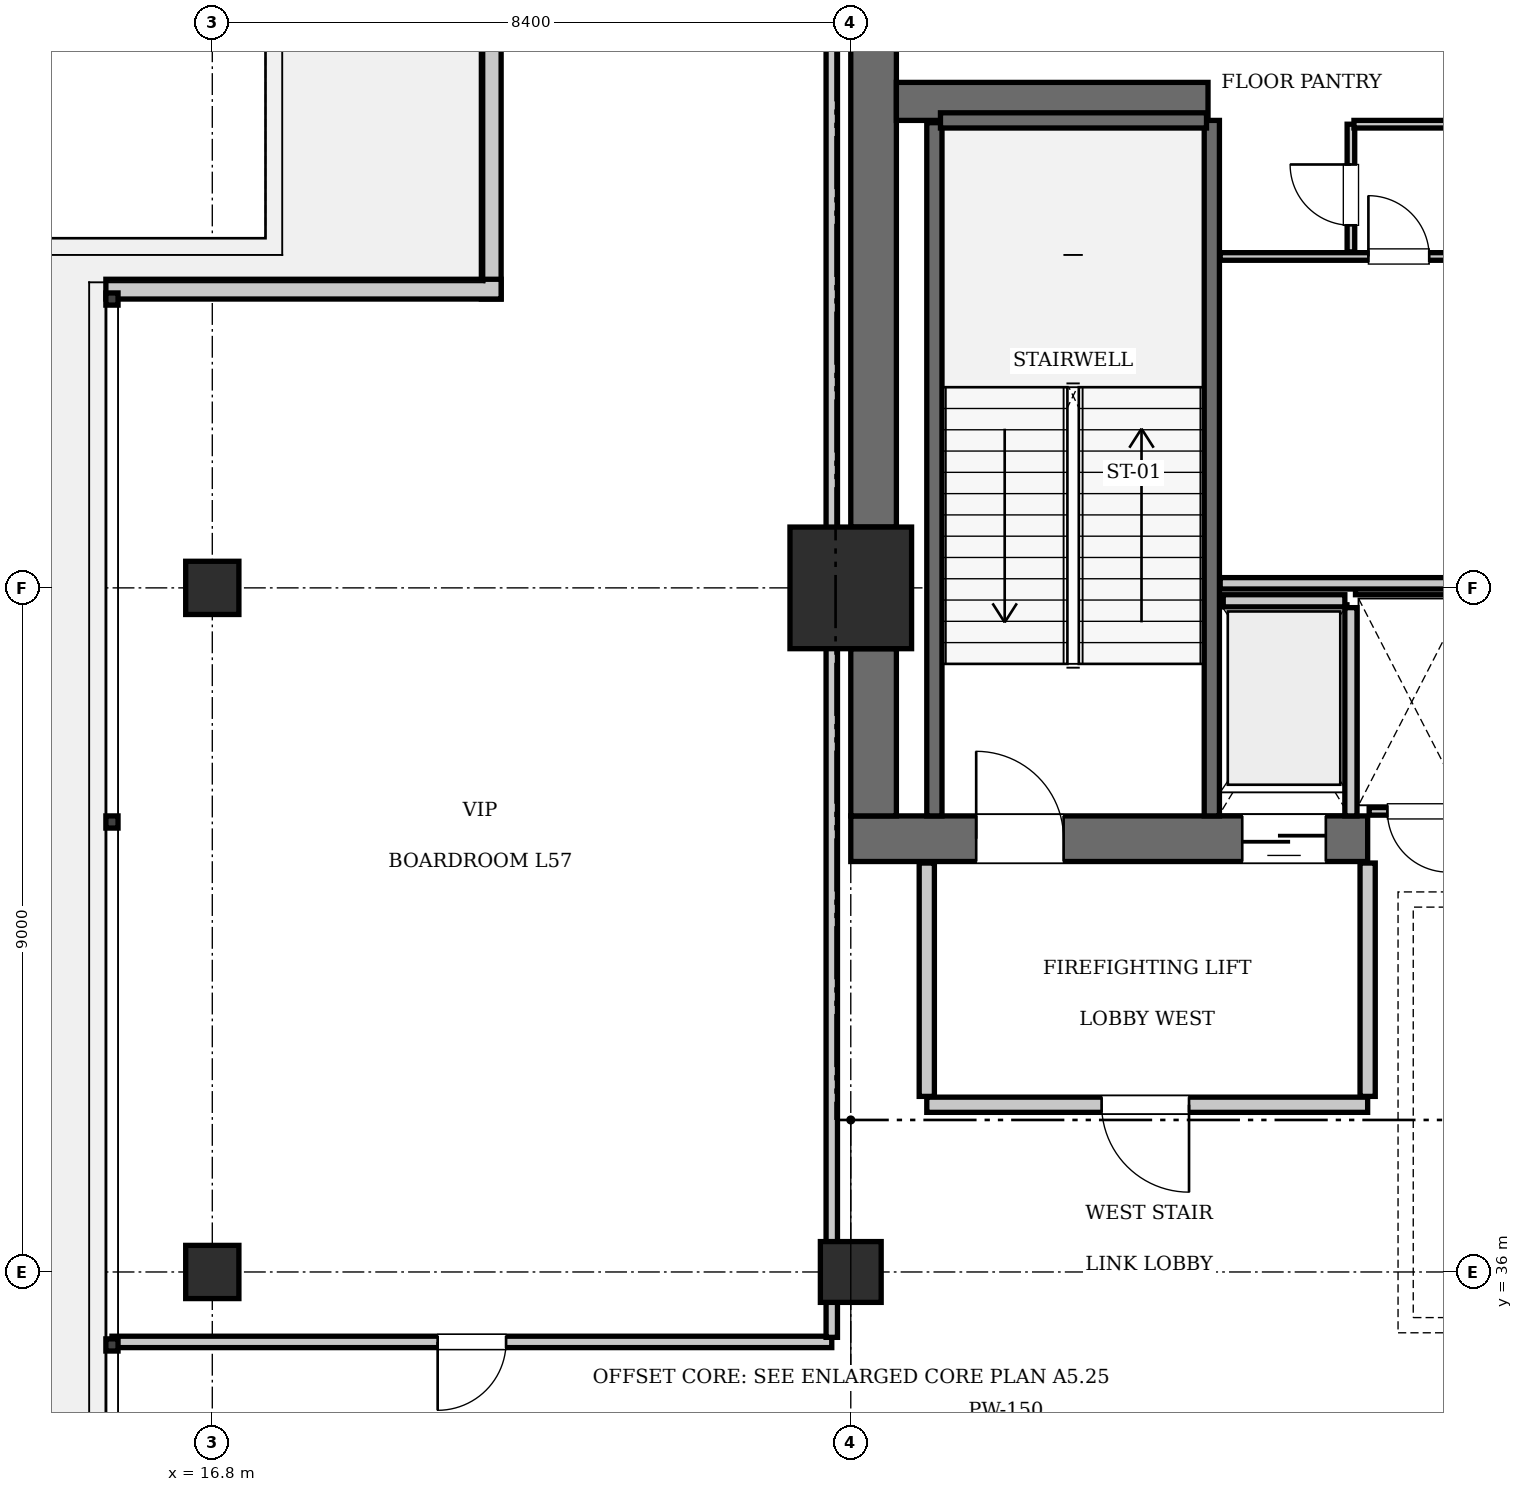
"""IFC4 building model, lengths in metres.
Left out: names, types, materials, properties, quantities, classifications, styles, units other than length and angle.
Written with IfcOpenShell. Run it as: python <this file> out.ifc"""

import sys

from ifc_helpers import new_model, si_unit, direction, frame, frame_2d, origin, origin_2d, place, context, subcontext, project, spatial, rectangle, extrude, element, fill, save


model = new_model("IFC4")
c1 = context("Model", 3, precision=1e-05, world=origin(), true_north=direction((0.0, 1.0)))
c2 = subcontext(c1, "Body", "Model", "MODEL_VIEW")
j1 = project(units=[si_unit("LENGTHUNIT", "METRE"), si_unit("PLANEANGLEUNIT", "RADIAN")], contexts=[c1])
p1 = place(None, origin())
s1 = spatial("IfcSite", under=j1, at=p1, CompositionType="ELEMENT")
p2 = place(p1, origin())
s2 = spatial("IfcBuilding", under=s1, at=p2, CompositionType="ELEMENT")
p3 = place(p2, frame((0.0, 0.0, 234.5)))
s3 = spatial("IfcBuildingStorey", under=s2, at=p3, CompositionType="ELEMENT", Elevation=234.5)
p4 = place(p3, frame((25.2, 45.0, 0.0), z_axis=(0.0, 0.0, 1.0), x_axis=(1.0, 0.0, 0.0)))
e1 = element("IfcColumn", 1, at=p4, inside=s3, PredefinedType="COLUMN", context=c2, shape_type="SweptSolid", body=[
    extrude(rectangle(XDim=1.6, YDim=1.6, at=origin_2d()), origin(), (0.0, 0.0, 1.0), 4.9),
])
p5 = place(p3, frame((25.2, 41.7, 0.0), z_axis=(0.0, 0.0, 1.0), x_axis=(1.0, 0.0, 0.0)))
e2 = element("IfcWall", 2, at=p5, inside=s3, PredefinedType="SHEAR", context=c2, shape_type="SweptSolid", body=[
    extrude(rectangle(XDim=6.8, YDim=0.6, at=frame_2d((3.4, 0.0))), origin(), (0.0, 0.0, 1.0), 4.9),
])
p6 = place(p5, frame((1.65, 0.0, 0.0)))
e3 = element("IfcOpeningElement", 3, at=p6, cuts=e2, PredefinedType="OPENING", context=c2, shape_type="SweptSolid", body=[
    extrude(rectangle(XDim=1.15, YDim=2.15, at=frame_2d((0.575, 1.075))), frame((0.0, 0.31, 0.0), z_axis=(0.0, -1.0, 0.0), x_axis=(1.0, 0.0, 0.0)), (0.0, 0.0, 1.0), 0.62),
])
p7 = place(p5, frame((5.15, 0.0, 0.0)))
e4 = element("IfcOpeningElement", 4, at=p7, cuts=e2, PredefinedType="OPENING", context=c2, shape_type="SweptSolid", body=[
    extrude(rectangle(XDim=1.1, YDim=2.2, at=frame_2d((0.55, 1.1))), frame((0.0, 0.31, 0.0), z_axis=(0.0, -1.0, 0.0), x_axis=(1.0, 0.0, 0.0)), (0.0, 0.0, 1.0), 0.62),
])
p8 = place(p3, frame((25.5, 42.0, 0.0), z_axis=(0.0, 0.0, 1.0), x_axis=(0.0, 1.0, 0.0)))
e5 = element("IfcWall", 5, at=p8, inside=s3, PredefinedType="SHEAR", context=c2, shape_type="SweptSolid", body=[
    extrude(rectangle(XDim=2.2, YDim=0.6, at=frame_2d((1.1, 0.0))), origin(), (0.0, 0.0, 1.0), 4.9),
])
p9 = place(p3, frame((25.5, 45.8, 0.0), z_axis=(0.0, 0.0, 1.0), x_axis=(0.0, 1.0, 0.0)))
e6 = element("IfcWall", 6, at=p9, inside=s3, PredefinedType="SHEAR", context=c2, shape_type="SweptSolid", body=[
    extrude(rectangle(XDim=7.6, YDim=0.6, at=frame_2d((3.8, 0.0))), origin(), (0.0, 0.0, 1.0), 4.9),
])
p10 = place(p3, frame((25.8, 51.4, 0.0), z_axis=(0.0, 0.0, 1.0), x_axis=(1.0, 0.0, 0.0)))
e7 = element("IfcWall", 7, at=p10, inside=s3, PredefinedType="SHEAR", context=c2, shape_type="SweptSolid", body=[
    extrude(rectangle(XDim=4.1, YDim=0.5, at=frame_2d((2.05, 0.0))), origin(), (0.0, 0.0, 1.0), 4.9),
])
p11 = place(p3, frame((25.2, 36.0, 0.0), z_axis=(0.0, 0.0, 1.0), x_axis=(1.0, 0.0, 0.0)))
e8 = element("IfcColumn", 8, at=p11, inside=s3, PredefinedType="COLUMN", context=c2, shape_type="SweptSolid", body=[
    extrude(rectangle(XDim=0.8, YDim=0.8, at=origin_2d()), origin(), (0.0, 0.0, 1.0), 4.9),
])
for number, where, z_axis, x_axis in (
    (9, (16.8, 36.0, 0.0), (0.0, 0.0, 1.0), (1.0, 0.0, 0.0)),
    (10, (16.8, 45.0, 0.0), (0.0, 0.0, 1.0), (1.0, 0.0, 0.0)),
):
    element("IfcColumn", number, at=place(p3, frame(where, z_axis=z_axis, x_axis=x_axis)), inside=s3, PredefinedType="COLUMN", context=c2, shape_type="SweptSolid", body=[
        extrude(rectangle(XDim=0.7, YDim=0.7, at=origin_2d()), origin(), (0.0, 0.0, 1.0), 4.9),
    ])
p12 = place(p3, frame((29.95, 42.0, 0.0), z_axis=(0.0, 0.0, 1.0), x_axis=(0.0, 1.0, 0.0)))
e11 = element("IfcWall", 11, at=p12, inside=s3, PredefinedType="SOLIDWALL", context=c2, shape_type="SweptSolid", body=[
    extrude(rectangle(XDim=9.15, YDim=0.2, at=frame_2d((4.575, 0.0))), origin(), (0.0, 0.0, 1.0), 4.66),
])
p13 = place(p3, frame((26.3, 42.0, 0.0), z_axis=(0.0, 0.0, 1.0), x_axis=(0.0, 1.0, 0.0)))
e12 = element("IfcWall", 12, at=p13, inside=s3, PredefinedType="SOLIDWALL", context=c2, shape_type="SweptSolid", body=[
    extrude(rectangle(XDim=9.12, YDim=0.2, at=frame_2d((4.56, 0.0))), origin(), (0.0, 0.0, 1.0), 4.66),
])
p14 = place(p3, frame((26.38, 51.15, 0.0), z_axis=(0.0, 0.0, 1.0), x_axis=(1.0, 0.0, 0.0)))
e13 = element("IfcWall", 13, at=p14, inside=s3, PredefinedType="SOLIDWALL", context=c2, shape_type="SweptSolid", body=[
    extrude(rectangle(XDim=3.5, YDim=0.2, at=frame_2d((1.75, 0.0))), origin(), (0.0, 0.0, 1.0), 4.66),
])
p15 = place(p3, frame((30.1, 44.83, 0.0), z_axis=(0.0, 0.0, 1.0), x_axis=(1.0, 0.0, 0.0)))
e14 = element("IfcWall", 14, at=p15, inside=s3, PredefinedType="SOLIDWALL", context=c2, shape_type="SweptSolid", body=[
    extrude(rectangle(XDim=1.6, YDim=0.16, at=frame_2d((0.8, 0.0))), origin(), (0.0, 0.0, 1.0), 4.66),
])
p16 = place(p3, frame((31.78, 42.0, 0.0), z_axis=(0.0, 0.0, 1.0), x_axis=(0.0, 1.0, 0.0)))
e15 = element("IfcWall", 15, at=p16, inside=s3, PredefinedType="SOLIDWALL", context=c2, shape_type="SweptSolid", body=[
    extrude(rectangle(XDim=2.74, YDim=0.16, at=frame_2d((1.37, 0.0))), origin(), (0.0, 0.0, 1.0), 4.66),
])
p17 = place(p3, frame((20.47, 48.8, 0.0), z_axis=(0.0, 0.0, 1.0), x_axis=(0.0, 1.0, 0.0)))
e16 = element("IfcWall", 16, at=p17, inside=s3, PredefinedType="SOLIDWALL", context=c2, shape_type="SweptSolid", body=[
    extrude(rectangle(XDim=5.2, YDim=0.26, at=frame_2d((2.6, 0.0))), origin(), (0.0, 0.0, 1.0), 4.66),
])
p18 = place(p3, frame((15.4, 48.93, 0.0), z_axis=(0.0, 0.0, 1.0), x_axis=(1.0, 0.0, 0.0)))
e17 = element("IfcWall", 17, at=p18, inside=s3, PredefinedType="SOLIDWALL", context=c2, shape_type="SweptSolid", body=[
    extrude(rectangle(XDim=5.2, YDim=0.26, at=frame_2d((2.6, 0.0))), origin(), (0.0, 0.0, 1.0), 4.66),
])
p19 = place(p3, frame((26.2, 38.2, 0.0), z_axis=(0.0, 0.0, 1.0), x_axis=(1.0, 0.0, 0.0)))
e18 = element("IfcWall", 18, at=p19, inside=s3, PredefinedType="PARTITIONING", context=c2, shape_type="SweptSolid", body=[
    extrude(rectangle(XDim=5.8, YDim=0.2, at=frame_2d((2.9, 0.0))), origin(), (0.0, 0.0, 1.0), 4.66),
])
p20 = place(p19, frame((2.3, 0.0, 0.0)))
e19 = element("IfcOpeningElement", 19, at=p20, cuts=e18, PredefinedType="OPENING", context=c2, shape_type="SweptSolid", body=[
    extrude(rectangle(XDim=1.15, YDim=2.15, at=frame_2d((0.575, 1.075))), frame((0.0, 0.11, 0.0), z_axis=(0.0, -1.0, 0.0), x_axis=(1.0, 0.0, 0.0)), (0.0, 0.0, 1.0), 0.22),
])
for number, where, z_axis, x_axis in (
    (20, (26.2, 38.31, 0.0), (0.0, 0.0, 1.0), (0.0, 1.0, 0.0)),
    (21, (32.0, 38.31, 0.0), (0.0, 0.0, 1.0), (0.0, 1.0, 0.0)),
):
    element("IfcWall", number, at=place(p3, frame(where, z_axis=z_axis, x_axis=x_axis)), inside=s3, PredefinedType="PARTITIONING", context=c2, shape_type="SweptSolid", body=[
        extrude(rectangle(XDim=3.07, YDim=0.2, at=frame_2d((1.535, 0.0))), origin(), (0.0, 0.0, 1.0), 4.66),
    ])
p21 = place(p3, frame((32.02, 42.06, 0.0), z_axis=(0.0, 0.0, 1.0), x_axis=(1.0, 0.0, 0.0)))
e22 = element("IfcWall", 22, at=p21, inside=s3, PredefinedType="PARTITIONING", context=c2, shape_type="SweptSolid", body=[
    extrude(rectangle(XDim=1.32, YDim=0.1, at=frame_2d((0.66, 0.0))), origin(), (0.0, 0.0, 1.0), 4.66),
])
p22 = place(p21, frame((0.24, 0.0, 0.0)))
e23 = element("IfcOpeningElement", 23, at=p22, cuts=e22, PredefinedType="OPENING", context=c2, shape_type="SweptSolid", body=[
    extrude(rectangle(XDim=0.8, YDim=2.05, at=frame_2d((0.4, 1.025))), frame((0.0, 0.06, 0.0), z_axis=(0.0, -1.0, 0.0), x_axis=(1.0, 0.0, 0.0)), (0.0, 0.0, 1.0), 0.12),
])
p23 = place(p3, frame((31.84, 44.96, 0.0), z_axis=(0.0, 0.0, 1.0), x_axis=(1.0, 0.0, 0.0)))
e24 = element("IfcWall", 24, at=p23, inside=s3, PredefinedType="PARTITIONING", context=c2, shape_type="SweptSolid", body=[
    extrude(rectangle(XDim=1.48, YDim=0.1, at=frame_2d((0.74, 0.0))), origin(), (0.0, 0.0, 1.0), 4.66),
])
p24 = place(p3, frame((30.06, 45.06, 0.0), z_axis=(0.0, 0.0, 1.0), x_axis=(1.0, 0.0, 0.0)))
e25 = element("IfcWall", 25, at=p24, inside=s3, PredefinedType="PARTITIONING", context=c2, shape_type="SweptSolid", body=[
    extrude(rectangle(XDim=3.18, YDim=0.15, at=frame_2d((1.59, 0.0))), origin(), (0.0, 0.0, 1.0), 4.66),
])
p25 = place(p3, frame((30.06, 49.36, 0.0), z_axis=(0.0, 0.0, 1.0), x_axis=(1.0, 0.0, 0.0)))
e26 = element("IfcWall", 26, at=p25, inside=s3, PredefinedType="PARTITIONING", context=c2, shape_type="SweptSolid", body=[
    extrude(rectangle(XDim=3.18, YDim=0.1, at=frame_2d((1.59, 0.0))), origin(), (0.0, 0.0, 1.0), 4.66),
])
p26 = place(p25, frame((1.95, 0.0, 0.0)))
e27 = element("IfcOpeningElement", 27, at=p26, cuts=e26, PredefinedType="OPENING", context=c2, shape_type="SweptSolid", body=[
    extrude(rectangle(XDim=0.8, YDim=2.05, at=frame_2d((0.4, 1.025))), frame((0.0, 0.06, 0.0), z_axis=(0.0, -1.0, 0.0), x_axis=(1.0, 0.0, 0.0)), (0.0, 0.0, 1.0), 0.12),
])
p27 = place(p3, frame((31.78, 49.42, 0.0), z_axis=(0.0, 0.0, 1.0), x_axis=(0.0, 1.0, 0.0)))
e28 = element("IfcWall", 28, at=p27, inside=s3, PredefinedType="PARTITIONING", context=c2, shape_type="SweptSolid", body=[
    extrude(rectangle(XDim=1.68, YDim=0.1, at=frame_2d((0.84, 0.0))), origin(), (0.0, 0.0, 1.0), 4.66),
])
p28 = place(p27, frame((0.35, 0.0, 0.0)))
e29 = element("IfcOpeningElement", 29, at=p28, cuts=e28, PredefinedType="OPENING", context=c2, shape_type="SweptSolid", body=[
    extrude(rectangle(XDim=0.8, YDim=2.05, at=frame_2d((0.4, 1.025))), frame((0.0, 0.06, 0.0), z_axis=(0.0, -1.0, 0.0), x_axis=(1.0, 0.0, 0.0)), (0.0, 0.0, 1.0), 0.12),
])
p29 = place(p3, frame((31.82, 51.1, 0.0), z_axis=(0.0, 0.0, 1.0), x_axis=(1.0, 0.0, 0.0)))
e30 = element("IfcWall", 30, at=p29, inside=s3, PredefinedType="PARTITIONING", context=c2, shape_type="SweptSolid", body=[
    extrude(rectangle(XDim=1.42, YDim=0.1, at=frame_2d((0.71, 0.0))), origin(), (0.0, 0.0, 1.0), 4.66),
])
p30 = place(p3, frame((15.48, 35.08, 0.0), z_axis=(0.0, 0.0, 1.0), x_axis=(1.0, 0.0, 0.0)))
e31 = element("IfcWall", 31, at=p30, inside=s3, PredefinedType="PARTITIONING", context=c2, shape_type="SweptSolid", body=[
    extrude(rectangle(XDim=9.47, YDim=0.15, at=frame_2d((4.735, 0.0))), origin(), (0.0, 0.0, 1.0), 4.66),
])
p31 = place(p30, frame((4.285, 0.0, 0.0)))
e32 = element("IfcOpeningElement", 32, at=p31, cuts=e31, PredefinedType="OPENING", context=c2, shape_type="SweptSolid", body=[
    extrude(rectangle(XDim=0.9, YDim=2.1, at=frame_2d((0.45, 1.05))), frame((0.0, 0.085, 0.0), z_axis=(0.0, -1.0, 0.0), x_axis=(1.0, 0.0, 0.0)), (0.0, 0.0, 1.0), 0.17),
])
p32 = place(p3, frame((24.95, 35.14, 0.0), z_axis=(0.0, 0.0, 1.0), x_axis=(0.0, 1.0, 0.0)))
e33 = element("IfcWall", 33, at=p32, inside=s3, PredefinedType="PARTITIONING", context=c2, shape_type="SweptSolid", body=[
    extrude(rectangle(XDim=18.78, YDim=0.15, at=frame_2d((9.39, 0.0))), origin(), (0.0, 0.0, 1.0), 4.66),
])
p33 = place(p6, origin())
e34 = element("IfcDoor", 34, at=p33, inside=s3, OperationType="SINGLE_SWING_LEFT", PredefinedType="DOOR", context=c2, shape_type="SweptSolid", body=[
    extrude(rectangle(XDim=1.15, YDim=2.15, at=frame_2d((0.575, 1.075))), frame((0.0, 0.025, 0.0), z_axis=(0.0, -1.0, 0.0), x_axis=(1.0, 0.0, 0.0)), (0.0, 0.0, 1.0), 0.05),
])
fill(e3, e34)
p34 = place(p7, frame((1.1, 0.0, 0.0), z_axis=(0.0, 0.0, 1.0), x_axis=(-1.0, 0.0, 0.0)))
e35 = element("IfcDoor", 35, at=p34, inside=s3, OperationType="SLIDING_TO_LEFT", PredefinedType="DOOR", context=c2, shape_type="SweptSolid", body=[
    extrude(rectangle(XDim=1.1, YDim=2.2, at=frame_2d((0.55, 1.1))), frame((0.0, 0.025, 0.0), z_axis=(0.0, -1.0, 0.0), x_axis=(1.0, 0.0, 0.0)), (0.0, 0.0, 1.0), 0.05),
])
fill(e4, e35)
p35 = place(p20, frame((1.15, 0.0, 0.0), z_axis=(0.0, 0.0, 1.0), x_axis=(-1.0, 0.0, 0.0)))
e36 = element("IfcDoor", 36, at=p35, inside=s3, OperationType="SINGLE_SWING_LEFT", PredefinedType="DOOR", context=c2, shape_type="SweptSolid", body=[
    extrude(rectangle(XDim=1.15, YDim=2.15, at=frame_2d((0.575, 1.075))), frame((0.0, 0.025, 0.0), z_axis=(0.0, -1.0, 0.0), x_axis=(1.0, 0.0, 0.0)), (0.0, 0.0, 1.0), 0.05),
])
fill(e19, e36)
p36 = place(p22, frame((0.8, 0.0, 0.0), z_axis=(0.0, 0.0, 1.0), x_axis=(-1.0, 0.0, 0.0)))
e37 = element("IfcDoor", 37, at=p36, inside=s3, OperationType="SINGLE_SWING_LEFT", PredefinedType="DOOR", context=c2, shape_type="SweptSolid", body=[
    extrude(rectangle(XDim=0.8, YDim=2.05, at=frame_2d((0.4, 1.025))), frame((0.0, 0.025, 0.0), z_axis=(0.0, -1.0, 0.0), x_axis=(1.0, 0.0, 0.0)), (0.0, 0.0, 1.0), 0.05),
])
fill(e23, e37)
p37 = place(p26, origin())
e38 = element("IfcDoor", 38, at=p37, inside=s3, OperationType="SINGLE_SWING_LEFT", PredefinedType="DOOR", context=c2, shape_type="SweptSolid", body=[
    extrude(rectangle(XDim=0.8, YDim=2.05, at=frame_2d((0.4, 1.025))), frame((0.0, 0.025, 0.0), z_axis=(0.0, -1.0, 0.0), x_axis=(1.0, 0.0, 0.0)), (0.0, 0.0, 1.0), 0.05),
])
fill(e27, e38)
p38 = place(p28, origin())
e39 = element("IfcDoor", 39, at=p38, inside=s3, OperationType="SINGLE_SWING_RIGHT", PredefinedType="DOOR", context=c2, shape_type="SweptSolid", body=[
    extrude(rectangle(XDim=0.8, YDim=2.05, at=frame_2d((0.4, 1.025))), frame((0.0, 0.025, 0.0), z_axis=(0.0, -1.0, 0.0), x_axis=(1.0, 0.0, 0.0)), (0.0, 0.0, 1.0), 0.05),
])
fill(e29, e39)
p39 = place(p31, frame((0.9, 0.0, 0.0), z_axis=(0.0, 0.0, 1.0), x_axis=(-1.0, 0.0, 0.0)))
e40 = element("IfcDoor", 40, at=p39, inside=s3, OperationType="SINGLE_SWING_RIGHT", PredefinedType="DOOR", context=c2, shape_type="SweptSolid", body=[
    extrude(rectangle(XDim=0.9, YDim=2.1, at=frame_2d((0.45, 1.05))), frame((0.0, 0.025, 0.0), z_axis=(0.0, -1.0, 0.0), x_axis=(1.0, 0.0, 0.0)), (0.0, 0.0, 1.0), 0.05),
])
fill(e32, e40)
save(model, sys.argv[1])
